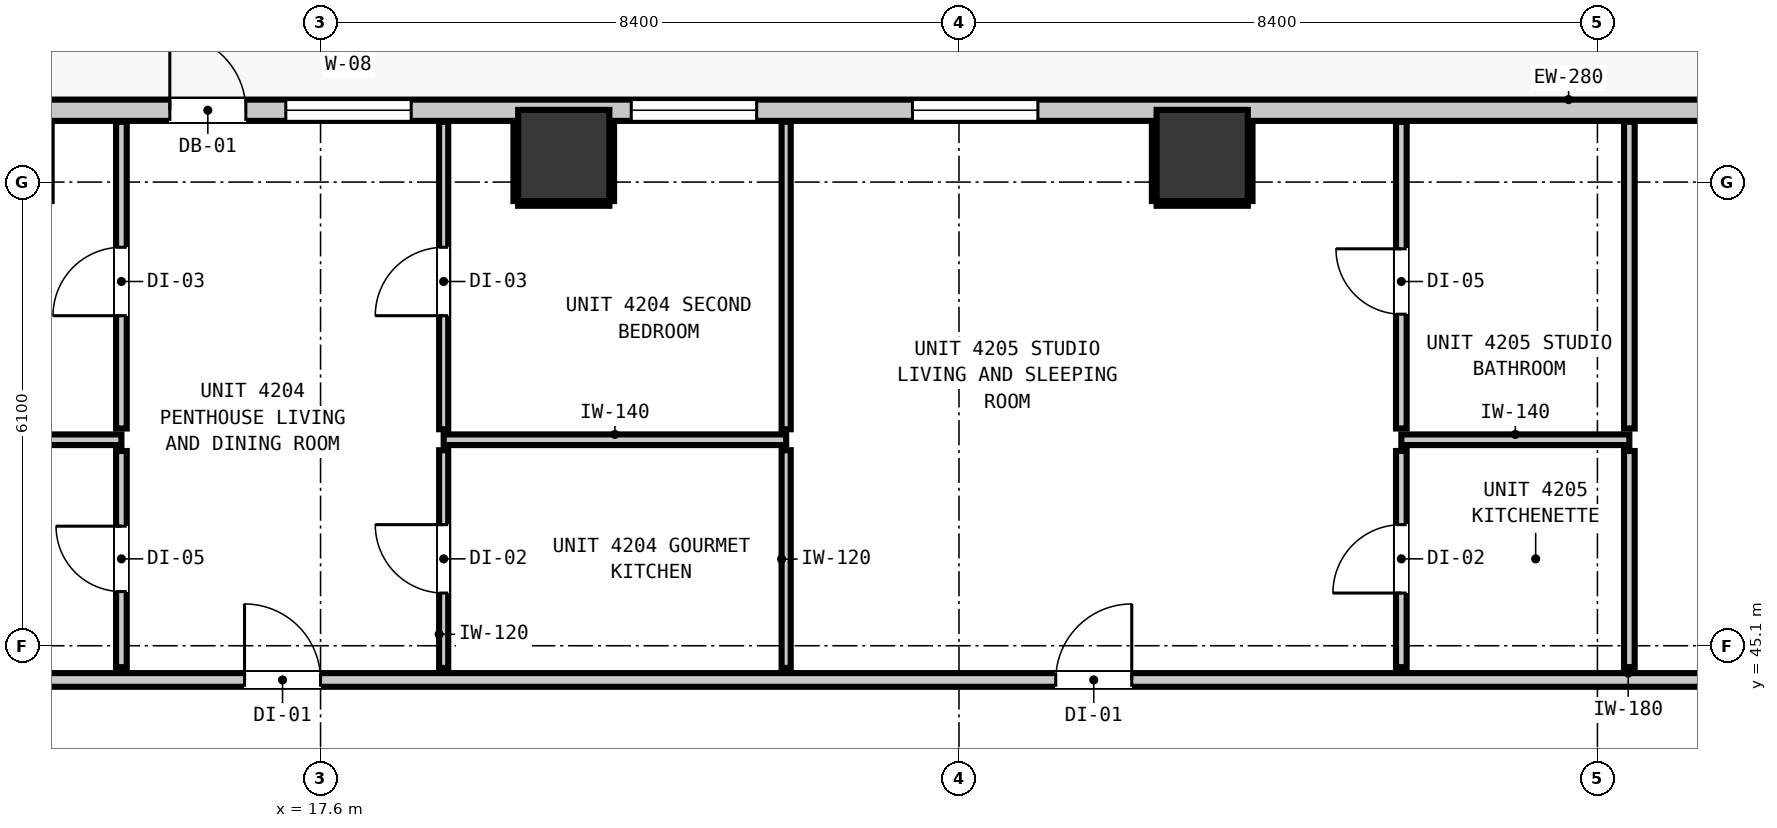
"""IFC4 building model, lengths in metres.
Left out: names, types, materials, properties, quantities, classifications, styles, units other than length and angle.
Written with IfcOpenShell. Run it as: python <this file> out.ifc"""

import sys

from ifc_helpers import new_model, si_unit, direction, frame, frame_2d, origin, origin_2d, place, context, subcontext, project, spatial, rectangle, extrude, element, fill, save


model = new_model("IFC4")
c1 = context("Model", 3, precision=1e-05, world=origin(), true_north=direction((0.0, 1.0)))
c2 = subcontext(c1, "Body", "Model", "MODEL_VIEW")
j1 = project(units=[si_unit("LENGTHUNIT", "METRE"), si_unit("PLANEANGLEUNIT", "RADIAN")], contexts=[c1])
p1 = place(None, origin())
s1 = spatial("IfcSite", under=j1, at=p1, CompositionType="ELEMENT")
p2 = place(p1, origin())
s2 = spatial("IfcBuilding", under=s1, at=p2, CompositionType="ELEMENT")
p3 = place(p2, frame((0.0, 0.0, 145.92)))
s3 = spatial("IfcBuildingStorey", under=s2, at=p3, CompositionType="ELEMENT", Elevation=145.92)
for number, where, z_axis, x_axis in (
    (1, (20.8, 51.55, -0.2), (0.0, 0.0, 1.0), (1.0, 0.0, 0.0)),
    (2, (29.2, 51.55, -0.2), (0.0, 0.0, 1.0), (1.0, 0.0, 0.0)),
):
    element("IfcColumn", number, at=place(p3, frame(where, z_axis=z_axis, x_axis=x_axis)), inside=s3, PredefinedType="COLUMN", context=c2, shape_type="SweptSolid", body=[
        extrude(rectangle(XDim=1.2, YDim=1.2, at=origin_2d()), origin(), (0.0, 0.0, 1.0), 3.52),
    ])
p4 = place(p3, frame((11.555, 52.145, 0.0), z_axis=(0.0, 0.0, 1.0), x_axis=(1.0, 0.0, 0.0)))
e3 = element("IfcWall", 3, at=p4, inside=s3, PredefinedType="STANDARD", context=c2, shape_type="SweptSolid", body=[
    extrude(rectangle(XDim=35.09, YDim=0.28, at=frame_2d((17.545, 0.0))), origin(), (0.0, 0.0, 1.0), 3.08),
])
p5 = place(p4, frame((4.062, 0.0, 0.0)))
e4 = element("IfcOpeningElement", 4, at=p5, cuts=e3, PredefinedType="OPENING", context=c2, shape_type="SweptSolid", body=[
    extrude(rectangle(XDim=1.0, YDim=2.15, at=frame_2d((0.5, 1.075))), frame((0.0, 0.15, 0.0), z_axis=(0.0, -1.0, 0.0), x_axis=(1.0, 0.0, 0.0)), (0.0, 0.0, 1.0), 0.3),
])
p6 = place(p4, frame((5.588, 0.0, 0.85)))
e5 = element("IfcOpeningElement", 5, at=p6, cuts=e3, PredefinedType="OPENING", context=c2, shape_type="SweptSolid", body=[
    extrude(rectangle(XDim=1.65, YDim=1.75, at=frame_2d((0.825, 0.875))), frame((0.0, 0.15, 0.0), z_axis=(0.0, -1.0, 0.0), x_axis=(1.0, 0.0, 0.0)), (0.0, 0.0, 1.0), 0.3),
])
p7 = place(p4, frame((0.378, 0.0, 0.85)))
e6 = element("IfcOpeningElement", 6, at=p7, cuts=e3, PredefinedType="OPENING", context=c2, shape_type="SweptSolid", body=[
    extrude(rectangle(XDim=0.58, YDim=1.5, at=frame_2d((0.29, 0.75))), frame((0.0, 0.15, 0.0), z_axis=(0.0, -1.0, 0.0), x_axis=(1.0, 0.0, 0.0)), (0.0, 0.0, 1.0), 0.3),
])
p8 = place(p4, frame((10.133, 0.0, 0.85)))
e7 = element("IfcOpeningElement", 7, at=p8, cuts=e3, PredefinedType="OPENING", context=c2, shape_type="SweptSolid", body=[
    extrude(rectangle(XDim=1.65, YDim=1.75, at=frame_2d((0.825, 0.875))), frame((0.0, 0.15, 0.0), z_axis=(0.0, -1.0, 0.0), x_axis=(1.0, 0.0, 0.0)), (0.0, 0.0, 1.0), 0.3),
])
p9 = place(p4, frame((13.833, 0.0, 0.85)))
e8 = element("IfcOpeningElement", 8, at=p9, cuts=e3, PredefinedType="OPENING", context=c2, shape_type="SweptSolid", body=[
    extrude(rectangle(XDim=1.65, YDim=1.75, at=frame_2d((0.825, 0.875))), frame((0.0, 0.15, 0.0), z_axis=(0.0, -1.0, 0.0), x_axis=(1.0, 0.0, 0.0)), (0.0, 0.0, 1.0), 0.3),
])
p10 = place(p4, frame((29.448, 0.0, 0.85)))
e9 = element("IfcOpeningElement", 9, at=p10, cuts=e3, PredefinedType="OPENING", context=c2, shape_type="SweptSolid", body=[
    extrude(rectangle(XDim=1.65, YDim=1.75, at=frame_2d((0.825, 0.875))), frame((0.0, 0.15, 0.0), z_axis=(0.0, -1.0, 0.0), x_axis=(1.0, 0.0, 0.0)), (0.0, 0.0, 1.0), 0.3),
])
p11 = place(p3, frame((9.407, 44.65, 0.0), z_axis=(0.0, 0.0, 1.0), x_axis=(1.0, 0.0, 0.0)))
e10 = element("IfcWall", 10, at=p11, inside=s3, PredefinedType="PARTITIONING", context=c2, shape_type="SweptSolid", body=[
    extrude(rectangle(XDim=39.386, YDim=0.18, at=frame_2d((19.693, 0.0))), origin(), (0.0, 0.0, 1.0), 3.08),
])
p12 = place(p11, frame((7.193, 0.0, 0.0)))
e11 = element("IfcOpeningElement", 11, at=p12, cuts=e10, PredefinedType="OPENING", context=c2, shape_type="SweptSolid", body=[
    extrude(rectangle(XDim=1.0, YDim=2.15, at=frame_2d((0.5, 1.075))), frame((0.0, 0.1, 0.0), z_axis=(0.0, -1.0, 0.0), x_axis=(1.0, 0.0, 0.0)), (0.0, 0.0, 1.0), 0.2),
])
p13 = place(p11, frame((17.866, 0.0, 0.0)))
e12 = element("IfcOpeningElement", 12, at=p13, cuts=e10, PredefinedType="OPENING", context=c2, shape_type="SweptSolid", body=[
    extrude(rectangle(XDim=1.0, YDim=2.15, at=frame_2d((0.5, 1.075))), frame((0.0, 0.1, 0.0), z_axis=(0.0, -1.0, 0.0), x_axis=(1.0, 0.0, 0.0)), (0.0, 0.0, 1.0), 0.2),
])
p14 = place(p11, frame((31.929, 0.0, 0.0)))
e13 = element("IfcOpeningElement", 13, at=p14, cuts=e10, PredefinedType="OPENING", context=c2, shape_type="SweptSolid", body=[
    extrude(rectangle(XDim=0.9, YDim=2.1, at=frame_2d((0.45, 1.05))), frame((0.0, 0.1, 0.0), z_axis=(0.0, -1.0, 0.0), x_axis=(1.0, 0.0, 0.0)), (0.0, 0.0, 1.0), 0.2),
])
p15 = place(p3, frame((9.407, 47.81, 0.0), z_axis=(0.0, 0.0, 1.0), x_axis=(1.0, 0.0, 0.0)))
e14 = element("IfcWall", 14, at=p15, inside=s3, PredefinedType="PARTITIONING", context=c2, shape_type="SweptSolid", body=[
    extrude(rectangle(XDim=5.573, YDim=0.14, at=frame_2d((2.787, 0.0))), origin(), (0.0, 0.0, 1.0), 3.08),
])
p16 = place(p3, frame((19.22, 47.81, 0.0), z_axis=(0.0, 0.0, 1.0), x_axis=(1.0, 0.0, 0.0)))
e15 = element("IfcWall", 15, at=p16, inside=s3, PredefinedType="PARTITIONING", context=c2, shape_type="SweptSolid", body=[
    extrude(rectangle(XDim=4.506, YDim=0.14, at=frame_2d((2.253, 0.0))), origin(), (0.0, 0.0, 1.0), 3.08),
])
p17 = place(p3, frame((31.82, 47.81, 0.0), z_axis=(0.0, 0.0, 1.0), x_axis=(1.0, 0.0, 0.0)))
e16 = element("IfcWall", 16, at=p17, inside=s3, PredefinedType="PARTITIONING", context=c2, shape_type="SweptSolid", body=[
    extrude(rectangle(XDim=3.0, YDim=0.14, at=frame_2d((1.5, 0.0))), origin(), (0.0, 0.0, 1.0), 3.08),
])
p18 = place(p3, frame((14.98, 44.818, 0.0), z_axis=(0.0, 0.0, 1.0), x_axis=(0.0, 1.0, 0.0)))
e17 = element("IfcWall", 17, at=p18, inside=s3, PredefinedType="PARTITIONING", context=c2, shape_type="SweptSolid", body=[
    extrude(rectangle(XDim=2.844, YDim=0.14, at=frame_2d((1.422, 0.0))), origin(), (0.0, 0.0, 1.0), 3.08),
])
p19 = place(p18, frame((0.995, 0.0, 0.0)))
e18 = element("IfcOpeningElement", 18, at=p19, cuts=e17, PredefinedType="OPENING", context=c2, shape_type="SweptSolid", body=[
    extrude(rectangle(XDim=0.86, YDim=2.02, at=frame_2d((0.43, 1.01))), frame((0.0, 0.08, 0.0), z_axis=(0.0, -1.0, 0.0), x_axis=(1.0, 0.0, 0.0)), (0.0, 0.0, 1.0), 0.16),
])
p20 = place(p3, frame((14.98, 47.958, 0.0), z_axis=(0.0, 0.0, 1.0), x_axis=(0.0, 1.0, 0.0)))
e19 = element("IfcWall", 19, at=p20, inside=s3, PredefinedType="PARTITIONING", context=c2, shape_type="SweptSolid", body=[
    extrude(rectangle(XDim=4.035, YDim=0.14, at=frame_2d((2.018, 0.0))), origin(), (0.0, 0.0, 1.0), 3.08),
])
p21 = place(p20, frame((1.484, 0.0, 0.0)))
e20 = element("IfcOpeningElement", 20, at=p21, cuts=e19, PredefinedType="OPENING", context=c2, shape_type="SweptSolid", body=[
    extrude(rectangle(XDim=0.9, YDim=2.1, at=frame_2d((0.45, 1.05))), frame((0.0, 0.08, 0.0), z_axis=(0.0, -1.0, 0.0), x_axis=(1.0, 0.0, 0.0)), (0.0, 0.0, 1.0), 0.16),
])
p22 = place(p3, frame((31.82, 44.818, 0.0), z_axis=(0.0, 0.0, 1.0), x_axis=(0.0, 1.0, 0.0)))
e21 = element("IfcWall", 21, at=p22, inside=s3, PredefinedType="PARTITIONING", context=c2, shape_type="SweptSolid", body=[
    extrude(rectangle(XDim=2.844, YDim=0.14, at=frame_2d((1.422, 0.0))), origin(), (0.0, 0.0, 1.0), 3.08),
])
p23 = place(p22, frame((0.975, 0.0, 0.0)))
e22 = element("IfcOpeningElement", 22, at=p23, cuts=e21, PredefinedType="OPENING", context=c2, shape_type="SweptSolid", body=[
    extrude(rectangle(XDim=0.9, YDim=2.1, at=frame_2d((0.45, 1.05))), frame((0.0, 0.08, 0.0), z_axis=(0.0, -1.0, 0.0), x_axis=(1.0, 0.0, 0.0)), (0.0, 0.0, 1.0), 0.16),
])
p24 = place(p3, frame((31.82, 47.958, 0.0), z_axis=(0.0, 0.0, 1.0), x_axis=(0.0, 1.0, 0.0)))
e23 = element("IfcWall", 23, at=p24, inside=s3, PredefinedType="PARTITIONING", context=c2, shape_type="SweptSolid", body=[
    extrude(rectangle(XDim=4.035, YDim=0.14, at=frame_2d((2.018, 0.0))), origin(), (0.0, 0.0, 1.0), 3.08),
])
p25 = place(p24, frame((1.504, 0.0, 0.0)))
e24 = element("IfcOpeningElement", 24, at=p25, cuts=e23, PredefinedType="OPENING", context=c2, shape_type="SweptSolid", body=[
    extrude(rectangle(XDim=0.86, YDim=2.02, at=frame_2d((0.43, 1.01))), frame((0.0, 0.08, 0.0), z_axis=(0.0, -1.0, 0.0), x_axis=(1.0, 0.0, 0.0)), (0.0, 0.0, 1.0), 0.16),
])
p26 = place(p3, frame((34.82, 44.818, 0.0), z_axis=(0.0, 0.0, 1.0), x_axis=(0.0, 1.0, 0.0)))
e25 = element("IfcWall", 25, at=p26, inside=s3, PredefinedType="PARTITIONING", context=c2, shape_type="SweptSolid", body=[
    extrude(rectangle(XDim=2.844, YDim=0.14, at=frame_2d((1.422, 0.0))), origin(), (0.0, 0.0, 1.0), 3.08),
])
p27 = place(p3, frame((34.82, 47.958, 0.0), z_axis=(0.0, 0.0, 1.0), x_axis=(0.0, 1.0, 0.0)))
e26 = element("IfcWall", 26, at=p27, inside=s3, PredefinedType="PARTITIONING", context=c2, shape_type="SweptSolid", body=[
    extrude(rectangle(XDim=4.035, YDim=0.14, at=frame_2d((2.018, 0.0))), origin(), (0.0, 0.0, 1.0), 3.08),
])
p28 = place(p3, frame((19.22, 44.808, 0.0), z_axis=(0.0, 0.0, 1.0), x_axis=(0.0, 1.0, 0.0)))
e27 = element("IfcWall", 27, at=p28, inside=s3, PredefinedType="PARTITIONING", context=c2, shape_type="SweptSolid", body=[
    extrude(rectangle(XDim=2.864, YDim=0.12, at=frame_2d((1.432, 0.0))), origin(), (0.0, 0.0, 1.0), 3.08),
])
p29 = place(p28, frame((0.985, 0.0, 0.0)))
e28 = element("IfcOpeningElement", 28, at=p29, cuts=e27, PredefinedType="OPENING", context=c2, shape_type="SweptSolid", body=[
    extrude(rectangle(XDim=0.9, YDim=2.1, at=frame_2d((0.45, 1.05))), frame((0.0, 0.07, 0.0), z_axis=(0.0, -1.0, 0.0), x_axis=(1.0, 0.0, 0.0)), (0.0, 0.0, 1.0), 0.14),
])
p30 = place(p3, frame((19.22, 47.948, 0.0), z_axis=(0.0, 0.0, 1.0), x_axis=(0.0, 1.0, 0.0)))
e29 = element("IfcWall", 29, at=p30, inside=s3, PredefinedType="PARTITIONING", context=c2, shape_type="SweptSolid", body=[
    extrude(rectangle(XDim=4.045, YDim=0.12, at=frame_2d((2.022, 0.0))), origin(), (0.0, 0.0, 1.0), 3.08),
])
p31 = place(p30, frame((1.494, 0.0, 0.0)))
e30 = element("IfcOpeningElement", 30, at=p31, cuts=e29, PredefinedType="OPENING", context=c2, shape_type="SweptSolid", body=[
    extrude(rectangle(XDim=0.9, YDim=2.1, at=frame_2d((0.45, 1.05))), frame((0.0, 0.07, 0.0), z_axis=(0.0, -1.0, 0.0), x_axis=(1.0, 0.0, 0.0)), (0.0, 0.0, 1.0), 0.14),
])
p32 = place(p3, frame((23.726, 44.808, 0.0), z_axis=(0.0, 0.0, 1.0), x_axis=(0.0, 1.0, 0.0)))
e31 = element("IfcWall", 31, at=p32, inside=s3, PredefinedType="PARTITIONING", context=c2, shape_type="SweptSolid", body=[
    extrude(rectangle(XDim=2.864, YDim=0.12, at=frame_2d((1.432, 0.0))), origin(), (0.0, 0.0, 1.0), 3.08),
])
p33 = place(p3, frame((23.726, 47.948, 0.0), z_axis=(0.0, 0.0, 1.0), x_axis=(0.0, 1.0, 0.0)))
e32 = element("IfcWall", 32, at=p33, inside=s3, PredefinedType="PARTITIONING", context=c2, shape_type="SweptSolid", body=[
    extrude(rectangle(XDim=4.045, YDim=0.12, at=frame_2d((2.022, 0.0))), origin(), (0.0, 0.0, 1.0), 3.08),
])
p34 = place(p3, frame((20.2, 50.918, 0.0), z_axis=(0.0, 0.0, 1.0), x_axis=(1.0, 0.0, 0.0)))
e33 = element("IfcWall", 33, at=p34, inside=s3, PredefinedType="PARTITIONING", context=c2, shape_type="SweptSolid", body=[
    extrude(rectangle(XDim=1.2, YDim=0.06, at=frame_2d((0.6, 0.0))), origin(), (0.0, 0.0, 1.0), 1.45),
])
for number, where, z_axis, x_axis in (
    (34, (20.168, 50.95, 0.0), (0.0, 0.0, 1.0), (0.0, 1.0, 0.0)),
    (35, (21.432, 50.95, 0.0), (0.0, 0.0, 1.0), (0.0, 1.0, 0.0)),
):
    element("IfcWall", number, at=place(p3, frame(where, z_axis=z_axis, x_axis=x_axis)), inside=s3, PredefinedType="PARTITIONING", context=c2, shape_type="SweptSolid", body=[
        extrude(rectangle(XDim=1.04, YDim=0.06, at=frame_2d((0.52, 0.0))), origin(), (0.0, 0.0, 1.0), 1.45),
    ])
p35 = place(p3, frame((28.6, 50.918, 0.0), z_axis=(0.0, 0.0, 1.0), x_axis=(1.0, 0.0, 0.0)))
e36 = element("IfcWall", 36, at=p35, inside=s3, PredefinedType="PARTITIONING", context=c2, shape_type="SweptSolid", body=[
    extrude(rectangle(XDim=1.2, YDim=0.06, at=frame_2d((0.6, 0.0))), origin(), (0.0, 0.0, 1.0), 1.45),
])
for number, where, z_axis, x_axis in (
    (37, (28.568, 50.95, 0.0), (0.0, 0.0, 1.0), (0.0, 1.0, 0.0)),
    (38, (29.832, 50.95, 0.0), (0.0, 0.0, 1.0), (0.0, 1.0, 0.0)),
):
    element("IfcWall", number, at=place(p3, frame(where, z_axis=z_axis, x_axis=x_axis)), inside=s3, PredefinedType="PARTITIONING", context=c2, shape_type="SweptSolid", body=[
        extrude(rectangle(XDim=1.04, YDim=0.06, at=frame_2d((0.52, 0.0))), origin(), (0.0, 0.0, 1.0), 1.45),
    ])
p36 = place(p5, origin())
e39 = element("IfcDoor", 39, at=p36, inside=s3, OperationType="SINGLE_SWING_LEFT", PredefinedType="DOOR", context=c2, shape_type="SweptSolid", body=[
    extrude(rectangle(XDim=1.0, YDim=2.15, at=frame_2d((0.5, 1.075))), frame((0.0, 0.025, 0.0), z_axis=(0.0, -1.0, 0.0), x_axis=(1.0, 0.0, 0.0)), (0.0, 0.0, 1.0), 0.05),
])
fill(e4, e39)
p37 = place(p6, origin())
e40 = element("IfcWindow", 40, at=p37, inside=s3, PartitioningType="SINGLE_PANEL", PredefinedType="WINDOW", context=c2, shape_type="SweptSolid", body=[
    extrude(rectangle(XDim=1.65, YDim=1.75, at=frame_2d((0.825, 0.875))), frame((0.0, 0.03, 0.0), z_axis=(0.0, -1.0, 0.0), x_axis=(1.0, 0.0, 0.0)), (0.0, 0.0, 1.0), 0.06),
])
fill(e5, e40)
p38 = place(p8, origin())
e41 = element("IfcWindow", 41, at=p38, inside=s3, PartitioningType="SINGLE_PANEL", PredefinedType="WINDOW", context=c2, shape_type="SweptSolid", body=[
    extrude(rectangle(XDim=1.65, YDim=1.75, at=frame_2d((0.825, 0.875))), frame((0.0, 0.03, 0.0), z_axis=(0.0, -1.0, 0.0), x_axis=(1.0, 0.0, 0.0)), (0.0, 0.0, 1.0), 0.06),
])
fill(e7, e41)
p39 = place(p9, origin())
e42 = element("IfcWindow", 42, at=p39, inside=s3, PartitioningType="SINGLE_PANEL", PredefinedType="WINDOW", context=c2, shape_type="SweptSolid", body=[
    extrude(rectangle(XDim=1.65, YDim=1.75, at=frame_2d((0.825, 0.875))), frame((0.0, 0.03, 0.0), z_axis=(0.0, -1.0, 0.0), x_axis=(1.0, 0.0, 0.0)), (0.0, 0.0, 1.0), 0.06),
])
fill(e8, e42)
p40 = place(p12, origin())
e43 = element("IfcDoor", 43, at=p40, inside=s3, OperationType="SINGLE_SWING_LEFT", PredefinedType="DOOR", context=c2, shape_type="SweptSolid", body=[
    extrude(rectangle(XDim=1.0, YDim=2.15, at=frame_2d((0.5, 1.075))), frame((0.0, 0.025, 0.0), z_axis=(0.0, -1.0, 0.0), x_axis=(1.0, 0.0, 0.0)), (0.0, 0.0, 1.0), 0.05),
])
fill(e11, e43)
p41 = place(p19, origin())
e44 = element("IfcDoor", 44, at=p41, inside=s3, OperationType="SINGLE_SWING_RIGHT", PredefinedType="DOOR", context=c2, shape_type="SweptSolid", body=[
    extrude(rectangle(XDim=0.86, YDim=2.02, at=frame_2d((0.43, 1.01))), frame((0.0, 0.025, 0.0), z_axis=(0.0, -1.0, 0.0), x_axis=(1.0, 0.0, 0.0)), (0.0, 0.0, 1.0), 0.05),
])
fill(e18, e44)
p42 = place(p21, origin())
e45 = element("IfcDoor", 45, at=p42, inside=s3, OperationType="SINGLE_SWING_LEFT", PredefinedType="DOOR", context=c2, shape_type="SweptSolid", body=[
    extrude(rectangle(XDim=0.9, YDim=2.1, at=frame_2d((0.45, 1.05))), frame((0.0, 0.025, 0.0), z_axis=(0.0, -1.0, 0.0), x_axis=(1.0, 0.0, 0.0)), (0.0, 0.0, 1.0), 0.05),
])
fill(e20, e45)
p43 = place(p29, origin())
e46 = element("IfcDoor", 46, at=p43, inside=s3, OperationType="SINGLE_SWING_RIGHT", PredefinedType="DOOR", context=c2, shape_type="SweptSolid", body=[
    extrude(rectangle(XDim=0.9, YDim=2.1, at=frame_2d((0.45, 1.05))), frame((0.0, 0.025, 0.0), z_axis=(0.0, -1.0, 0.0), x_axis=(1.0, 0.0, 0.0)), (0.0, 0.0, 1.0), 0.05),
])
fill(e28, e46)
p44 = place(p31, origin())
e47 = element("IfcDoor", 47, at=p44, inside=s3, OperationType="SINGLE_SWING_LEFT", PredefinedType="DOOR", context=c2, shape_type="SweptSolid", body=[
    extrude(rectangle(XDim=0.9, YDim=2.1, at=frame_2d((0.45, 1.05))), frame((0.0, 0.025, 0.0), z_axis=(0.0, -1.0, 0.0), x_axis=(1.0, 0.0, 0.0)), (0.0, 0.0, 1.0), 0.05),
])
fill(e30, e47)
p45 = place(p13, origin())
e48 = element("IfcDoor", 48, at=p45, inside=s3, OperationType="SINGLE_SWING_RIGHT", PredefinedType="DOOR", context=c2, shape_type="SweptSolid", body=[
    extrude(rectangle(XDim=1.0, YDim=2.15, at=frame_2d((0.5, 1.075))), frame((0.0, 0.025, 0.0), z_axis=(0.0, -1.0, 0.0), x_axis=(1.0, 0.0, 0.0)), (0.0, 0.0, 1.0), 0.05),
])
fill(e12, e48)
p46 = place(p23, origin())
e49 = element("IfcDoor", 49, at=p46, inside=s3, OperationType="SINGLE_SWING_LEFT", PredefinedType="DOOR", context=c2, shape_type="SweptSolid", body=[
    extrude(rectangle(XDim=0.9, YDim=2.1, at=frame_2d((0.45, 1.05))), frame((0.0, 0.025, 0.0), z_axis=(0.0, -1.0, 0.0), x_axis=(1.0, 0.0, 0.0)), (0.0, 0.0, 1.0), 0.05),
])
fill(e22, e49)
p47 = place(p25, origin())
e50 = element("IfcDoor", 50, at=p47, inside=s3, OperationType="SINGLE_SWING_RIGHT", PredefinedType="DOOR", context=c2, shape_type="SweptSolid", body=[
    extrude(rectangle(XDim=0.86, YDim=2.02, at=frame_2d((0.43, 1.01))), frame((0.0, 0.025, 0.0), z_axis=(0.0, -1.0, 0.0), x_axis=(1.0, 0.0, 0.0)), (0.0, 0.0, 1.0), 0.05),
])
fill(e24, e50)
save(model, sys.argv[1])
